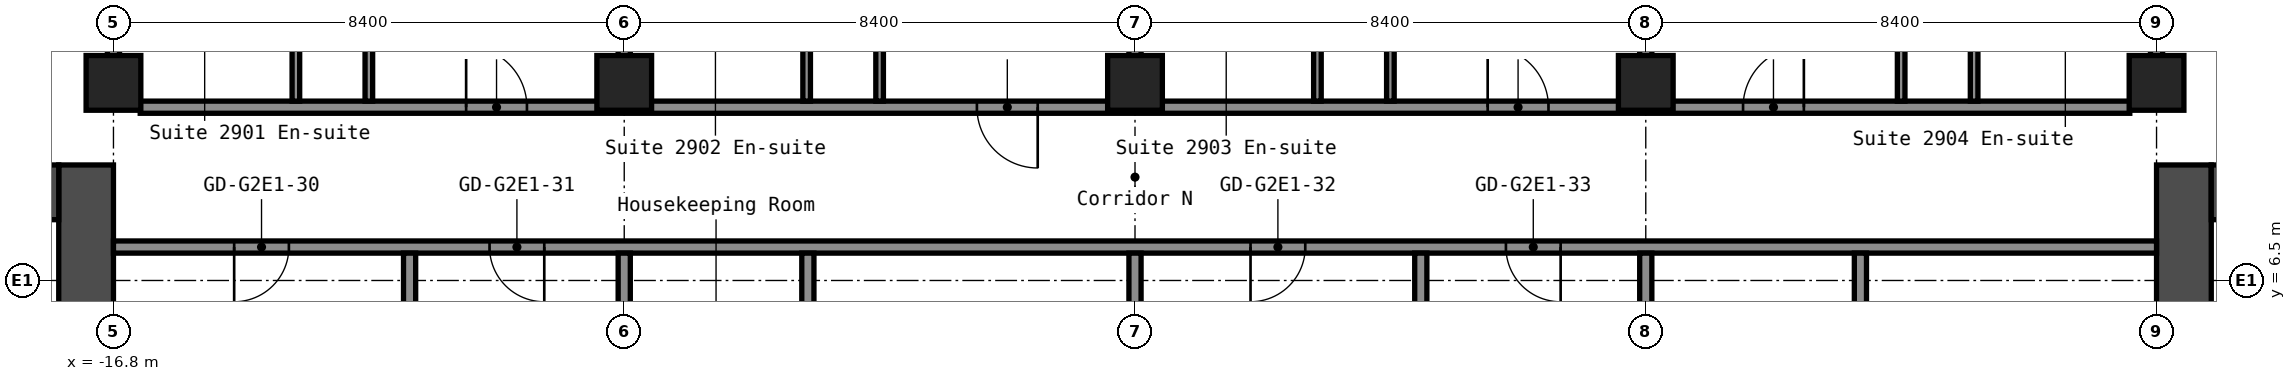
"""IFC4 building model, lengths in metres.
Left out: names, types, materials, properties, quantities, classifications, styles, units other than length and angle.
Written with IfcOpenShell. Run it as: python <this file> out.ifc"""

import sys

from ifc_helpers import new_model, si_unit, direction, frame, frame_2d, origin, origin_2d, place, context, subcontext, project, spatial, rectangle, hollow_rectangle, extrude, element, fill, save


model = new_model("IFC4")
c1 = context("Model", 3, precision=1e-05, world=origin(), true_north=direction((0.0, 1.0)))
c2 = subcontext(c1, "Body", "Model", "MODEL_VIEW")
j1 = project(units=[si_unit("LENGTHUNIT", "METRE"), si_unit("PLANEANGLEUNIT", "RADIAN")], contexts=[c1])
p1 = place(None, origin())
s1 = spatial("IfcSite", under=j1, at=p1, CompositionType="ELEMENT")
p2 = place(p1, origin())
s2 = spatial("IfcBuilding", under=s1, at=p2, CompositionType="ELEMENT")
p3 = place(p2, frame((0.0, 0.0, 104.2)))
s3 = spatial("IfcBuildingStorey", under=s2, at=p3, CompositionType="ELEMENT", Elevation=104.2)
for number, where, z_axis, x_axis in (
    (1, (-16.8, 9.75, 0.0), (0.0, 0.0, 1.0), (1.0, 0.0, 0.0)),
    (2, (-8.4, 9.75, 0.0), (0.0, 0.0, 1.0), (1.0, 0.0, 0.0)),
    (3, (0.0, 9.75, 0.0), (0.0, 0.0, 1.0), (1.0, 0.0, 0.0)),
    (4, (8.4, 9.75, 0.0), (0.0, 0.0, 1.0), (1.0, 0.0, 0.0)),
    (5, (16.8, 9.75, 0.0), (0.0, 0.0, 1.0), (1.0, 0.0, 0.0)),
):
    element("IfcColumn", number, at=place(p3, frame(where, z_axis=z_axis, x_axis=x_axis)), inside=s3, PredefinedType="COLUMN", context=c2, shape_type="SweptSolid", body=[
        extrude(hollow_rectangle(XDim=0.9, YDim=0.9, WallThickness=0.036, at=origin_2d()), origin(), (0.0, 0.0, 1.0), 2.8),
    ])
p4 = place(p3, frame((-17.25, -8.4, 0.0), z_axis=(0.0, 0.0, 1.0), x_axis=(0.0, 1.0, 0.0)))
e6 = element("IfcWall", 6, at=p4, inside=s3, PredefinedType="SHEAR", context=c2, shape_type="SweptSolid", body=[
    extrude(rectangle(XDim=16.8, YDim=0.9, at=frame_2d((8.4, 0.0))), origin(), (0.0, 0.0, 1.0), 2.8),
])
p5 = place(p4, frame((7.6, 0.0, 0.0)))
e7 = element("IfcOpeningElement", 7, at=p5, cuts=e6, PredefinedType="OPENING", context=c2, shape_type="SweptSolid", body=[
    extrude(rectangle(XDim=1.2, YDim=2.1, at=frame_2d((0.6, 1.05))), frame((0.0, 0.46, 0.0), z_axis=(0.0, -1.0, 0.0), x_axis=(1.0, 0.0, 0.0)), (0.0, 0.0, 1.0), 0.92),
])
p6 = place(p3, frame((-32.7, 7.95, 0.0), z_axis=(0.0, 0.0, 1.0), x_axis=(1.0, 0.0, 0.0)))
e8 = element("IfcWall", 8, at=p6, inside=s3, PredefinedType="SHEAR", context=c2, shape_type="SweptSolid", body=[
    extrude(rectangle(XDim=15.0, YDim=0.9, at=frame_2d((7.5, 0.0))), origin(), (0.0, 0.0, 1.0), 2.8),
])
p7 = place(p6, frame((3.4, 0.0, 0.0)))
e9 = element("IfcOpeningElement", 9, at=p7, cuts=e8, PredefinedType="OPENING", context=c2, shape_type="SweptSolid", body=[
    extrude(rectangle(XDim=1.2, YDim=2.1, at=frame_2d((0.6, 1.05))), frame((0.0, 0.46, 0.0), z_axis=(0.0, -1.0, 0.0), x_axis=(1.0, 0.0, 0.0)), (0.0, 0.0, 1.0), 0.92),
])
p8 = place(p6, frame((0.75, 0.0, 0.0)))
e10 = element("IfcOpeningElement", 10, at=p8, cuts=e8, PredefinedType="OPENING", context=c2, shape_type="SweptSolid", body=[
    extrude(rectangle(XDim=0.9, YDim=2.1, at=frame_2d((0.45, 1.05))), frame((0.0, 0.46, 0.0), z_axis=(0.0, -1.0, 0.0), x_axis=(1.0, 0.0, 0.0)), (0.0, 0.0, 1.0), 0.92),
])
p9 = place(p3, frame((17.25, -8.4, 0.0), z_axis=(0.0, 0.0, 1.0), x_axis=(0.0, 1.0, 0.0)))
e11 = element("IfcWall", 11, at=p9, inside=s3, PredefinedType="SHEAR", context=c2, shape_type="SweptSolid", body=[
    extrude(rectangle(XDim=16.8, YDim=0.9, at=frame_2d((8.4, 0.0))), origin(), (0.0, 0.0, 1.0), 2.8),
])
p10 = place(p9, frame((7.6, 0.0, 0.0)))
e12 = element("IfcOpeningElement", 12, at=p10, cuts=e11, PredefinedType="OPENING", context=c2, shape_type="SweptSolid", body=[
    extrude(rectangle(XDim=1.2, YDim=2.1, at=frame_2d((0.6, 1.05))), frame((0.0, 0.46, 0.0), z_axis=(0.0, -1.0, 0.0), x_axis=(1.0, 0.0, 0.0)), (0.0, 0.0, 1.0), 0.92),
])
p11 = place(p3, frame((17.7, 7.95, 0.0), z_axis=(0.0, 0.0, 1.0), x_axis=(1.0, 0.0, 0.0)))
e13 = element("IfcWall", 13, at=p11, inside=s3, PredefinedType="SHEAR", context=c2, shape_type="SweptSolid", body=[
    extrude(rectangle(XDim=15.0, YDim=0.9, at=frame_2d((7.5, 0.0))), origin(), (0.0, 0.0, 1.0), 2.8),
])
p12 = place(p11, frame((10.4, 0.0, 0.0)))
e14 = element("IfcOpeningElement", 14, at=p12, cuts=e13, PredefinedType="OPENING", context=c2, shape_type="SweptSolid", body=[
    extrude(rectangle(XDim=1.2, YDim=2.1, at=frame_2d((0.6, 1.05))), frame((0.0, 0.46, 0.0), z_axis=(0.0, -1.0, 0.0), x_axis=(1.0, 0.0, 0.0)), (0.0, 0.0, 1.0), 0.92),
])
p13 = place(p11, frame((13.35, 0.0, 0.0)))
e15 = element("IfcOpeningElement", 15, at=p13, cuts=e13, PredefinedType="OPENING", context=c2, shape_type="SweptSolid", body=[
    extrude(rectangle(XDim=0.9, YDim=2.1, at=frame_2d((0.45, 1.05))), frame((0.0, 0.46, 0.0), z_axis=(0.0, -1.0, 0.0), x_axis=(1.0, 0.0, 0.0)), (0.0, 0.0, 1.0), 0.92),
])
p14 = place(p3, frame((-16.8, 7.05, 0.0), z_axis=(0.0, 0.0, 1.0), x_axis=(1.0, 0.0, 0.0)))
e16 = element("IfcWall", 16, at=p14, inside=s3, PredefinedType="PARTITIONING", context=c2, shape_type="SweptSolid", body=[
    extrude(rectangle(XDim=33.6, YDim=0.2, at=frame_2d((16.8, 0.0))), origin(), (0.0, 0.0, 1.0), 2.8),
])
p15 = place(p14, frame((1.985, 0.0, 0.0)))
e17 = element("IfcOpeningElement", 17, at=p15, cuts=e16, PredefinedType="OPENING", context=c2, shape_type="SweptSolid", body=[
    extrude(rectangle(XDim=0.9, YDim=2.1, at=frame_2d((0.45, 1.05))), frame((0.0, 0.11, 0.0), z_axis=(0.0, -1.0, 0.0), x_axis=(1.0, 0.0, 0.0)), (0.0, 0.0, 1.0), 0.22),
])
p16 = place(p14, frame((6.185, 0.0, 0.0)))
e18 = element("IfcOpeningElement", 18, at=p16, cuts=e16, PredefinedType="OPENING", context=c2, shape_type="SweptSolid", body=[
    extrude(rectangle(XDim=0.9, YDim=2.1, at=frame_2d((0.45, 1.05))), frame((0.0, 0.11, 0.0), z_axis=(0.0, -1.0, 0.0), x_axis=(1.0, 0.0, 0.0)), (0.0, 0.0, 1.0), 0.22),
])
p17 = place(p14, frame((18.7, 0.0, 0.0)))
e19 = element("IfcOpeningElement", 19, at=p17, cuts=e16, PredefinedType="OPENING", context=c2, shape_type="SweptSolid", body=[
    extrude(rectangle(XDim=0.9, YDim=2.1, at=frame_2d((0.45, 1.05))), frame((0.0, 0.11, 0.0), z_axis=(0.0, -1.0, 0.0), x_axis=(1.0, 0.0, 0.0)), (0.0, 0.0, 1.0), 0.22),
])
p18 = place(p14, frame((22.9, 0.0, 0.0)))
e20 = element("IfcOpeningElement", 20, at=p18, cuts=e16, PredefinedType="OPENING", context=c2, shape_type="SweptSolid", body=[
    extrude(rectangle(XDim=0.9, YDim=2.1, at=frame_2d((0.45, 1.05))), frame((0.0, 0.11, 0.0), z_axis=(0.0, -1.0, 0.0), x_axis=(1.0, 0.0, 0.0)), (0.0, 0.0, 1.0), 0.22),
])
p19 = place(p3, frame((-16.36, 9.35, 0.0), z_axis=(0.0, 0.0, 1.0), x_axis=(1.0, 0.0, 0.0)))
e21 = element("IfcWall", 21, at=p19, inside=s3, PredefinedType="PARTITIONING", context=c2, shape_type="SweptSolid", body=[
    extrude(rectangle(XDim=32.72, YDim=0.2, at=frame_2d((16.36, 0.0))), origin(), (0.0, 0.0, 1.0), 2.8),
])
p20 = place(p19, frame((5.36, 0.0, 0.0)))
e22 = element("IfcOpeningElement", 22, at=p20, cuts=e21, PredefinedType="OPENING", context=c2, shape_type="SweptSolid", body=[
    extrude(rectangle(XDim=1.0, YDim=2.1, at=frame_2d((0.5, 1.05))), frame((0.0, 0.11, 0.0), z_axis=(0.0, -1.0, 0.0), x_axis=(1.0, 0.0, 0.0)), (0.0, 0.0, 1.0), 0.22),
])
p21 = place(p19, frame((13.76, 0.0, 0.0)))
e23 = element("IfcOpeningElement", 23, at=p21, cuts=e21, PredefinedType="OPENING", context=c2, shape_type="SweptSolid", body=[
    extrude(rectangle(XDim=1.0, YDim=2.1, at=frame_2d((0.5, 1.05))), frame((0.0, 0.11, 0.0), z_axis=(0.0, -1.0, 0.0), x_axis=(1.0, 0.0, 0.0)), (0.0, 0.0, 1.0), 0.22),
])
p22 = place(p19, frame((22.16, 0.0, 0.0)))
e24 = element("IfcOpeningElement", 24, at=p22, cuts=e21, PredefinedType="OPENING", context=c2, shape_type="SweptSolid", body=[
    extrude(rectangle(XDim=1.0, YDim=2.1, at=frame_2d((0.5, 1.05))), frame((0.0, 0.11, 0.0), z_axis=(0.0, -1.0, 0.0), x_axis=(1.0, 0.0, 0.0)), (0.0, 0.0, 1.0), 0.22),
])
p23 = place(p19, frame((26.36, 0.0, 0.0)))
e25 = element("IfcOpeningElement", 25, at=p23, cuts=e21, PredefinedType="OPENING", context=c2, shape_type="SweptSolid", body=[
    extrude(rectangle(XDim=1.0, YDim=2.1, at=frame_2d((0.5, 1.05))), frame((0.0, 0.11, 0.0), z_axis=(0.0, -1.0, 0.0), x_axis=(1.0, 0.0, 0.0)), (0.0, 0.0, 1.0), 0.22),
])
p24 = place(p3, frame((-16.8, 10.19, 0.0), z_axis=(0.0, 0.0, 1.0), x_axis=(0.0, 1.0, 0.0)))
e26 = element("IfcWall", 26, at=p24, inside=s3, PredefinedType="PARTITIONING", context=c2, shape_type="SweptSolid", body=[
    extrude(rectangle(XDim=13.36, YDim=0.2, at=frame_2d((6.68, 0.0))), origin(), (0.0, 0.0, 1.0), 2.8),
])
p25 = place(p3, frame((-13.8, 9.45, 0.0), z_axis=(0.0, 0.0, 1.0), x_axis=(0.0, 1.0, 0.0)))
e27 = element("IfcWall", 27, at=p25, inside=s3, PredefinedType="PARTITIONING", context=c2, shape_type="SweptSolid", body=[
    extrude(rectangle(XDim=3.1, YDim=0.125, at=frame_2d((1.55, 0.0))), origin(), (0.0, 0.0, 1.0), 2.8),
])
p26 = place(p3, frame((-12.6, 9.45, 0.0), z_axis=(0.0, 0.0, 1.0), x_axis=(0.0, 1.0, 0.0)))
e28 = element("IfcWall", 28, at=p26, inside=s3, PredefinedType="PARTITIONING", context=c2, shape_type="SweptSolid", body=[
    extrude(rectangle(XDim=14.1, YDim=0.125, at=frame_2d((7.05, 0.0))), origin(), (0.0, 0.0, 1.0), 2.8),
])
p27 = place(p26, frame((4.05, 0.0, 0.0)))
e29 = element("IfcOpeningElement", 29, at=p27, cuts=e28, PredefinedType="OPENING", context=c2, shape_type="SweptSolid", body=[
    extrude(rectangle(XDim=0.9, YDim=2.1, at=frame_2d((0.45, 1.05))), frame((0.0, 0.073, 0.0), z_axis=(0.0, -1.0, 0.0), x_axis=(1.0, 0.0, 0.0)), (0.0, 0.0, 1.0), 0.145),
])
for number, where, z_axis, x_axis in (
    (30, (-11.93, 1.05, 0.0), (0.0, 0.0, 1.0), (0.0, 1.0, 0.0)),
    (31, (-8.4, 1.05, 0.0), (0.0, 0.0, 1.0), (0.0, 1.0, 0.0)),
):
    element("IfcWall", number, at=place(p3, frame(where, z_axis=z_axis, x_axis=x_axis)), inside=s3, PredefinedType="PARTITIONING", context=c2, shape_type="SweptSolid", body=[
        extrude(rectangle(XDim=5.9, YDim=0.2, at=frame_2d((2.95, 0.0))), origin(), (0.0, 0.0, 1.0), 2.8),
    ])
p28 = place(p3, frame((-8.4, 10.19, 0.0), z_axis=(0.0, 0.0, 1.0), x_axis=(0.0, 1.0, 0.0)))
e32 = element("IfcWall", 32, at=p28, inside=s3, PredefinedType="PARTITIONING", context=c2, shape_type="SweptSolid", body=[
    extrude(rectangle(XDim=13.36, YDim=0.2, at=frame_2d((6.68, 0.0))), origin(), (0.0, 0.0, 1.0), 2.8),
])
p29 = place(p3, frame((-5.4, 9.45, 0.0), z_axis=(0.0, 0.0, 1.0), x_axis=(0.0, 1.0, 0.0)))
e33 = element("IfcWall", 33, at=p29, inside=s3, PredefinedType="PARTITIONING", context=c2, shape_type="SweptSolid", body=[
    extrude(rectangle(XDim=3.1, YDim=0.125, at=frame_2d((1.55, 0.0))), origin(), (0.0, 0.0, 1.0), 2.8),
])
p30 = place(p3, frame((-5.38, 1.05, 0.0), z_axis=(0.0, 0.0, 1.0), x_axis=(0.0, 1.0, 0.0)))
e34 = element("IfcWall", 34, at=p30, inside=s3, PredefinedType="PARTITIONING", context=c2, shape_type="SweptSolid", body=[
    extrude(rectangle(XDim=5.9, YDim=0.2, at=frame_2d((2.95, 0.0))), origin(), (0.0, 0.0, 1.0), 2.8),
])
p31 = place(p3, frame((-4.2, 9.45, 0.0), z_axis=(0.0, 0.0, 1.0), x_axis=(0.0, 1.0, 0.0)))
e35 = element("IfcWall", 35, at=p31, inside=s3, PredefinedType="PARTITIONING", context=c2, shape_type="SweptSolid", body=[
    extrude(rectangle(XDim=14.1, YDim=0.125, at=frame_2d((7.05, 0.0))), origin(), (0.0, 0.0, 1.0), 2.8),
])
p32 = place(p31, frame((4.05, 0.0, 0.0)))
e36 = element("IfcOpeningElement", 36, at=p32, cuts=e35, PredefinedType="OPENING", context=c2, shape_type="SweptSolid", body=[
    extrude(rectangle(XDim=0.9, YDim=2.1, at=frame_2d((0.45, 1.05))), frame((0.0, 0.073, 0.0), z_axis=(0.0, -1.0, 0.0), x_axis=(1.0, 0.0, 0.0)), (0.0, 0.0, 1.0), 0.145),
])
p33 = place(p3, frame((0.0, 1.05, 0.0), z_axis=(0.0, 0.0, 1.0), x_axis=(0.0, 1.0, 0.0)))
e37 = element("IfcWall", 37, at=p33, inside=s3, PredefinedType="PARTITIONING", context=c2, shape_type="SweptSolid", body=[
    extrude(rectangle(XDim=5.9, YDim=0.2, at=frame_2d((2.95, 0.0))), origin(), (0.0, 0.0, 1.0), 2.8),
])
p34 = place(p3, frame((0.0, 10.19, 0.0), z_axis=(0.0, 0.0, 1.0), x_axis=(0.0, 1.0, 0.0)))
e38 = element("IfcWall", 38, at=p34, inside=s3, PredefinedType="PARTITIONING", context=c2, shape_type="SweptSolid", body=[
    extrude(rectangle(XDim=13.36, YDim=0.2, at=frame_2d((6.68, 0.0))), origin(), (0.0, 0.0, 1.0), 2.8),
])
p35 = place(p3, frame((3.0, 9.45, 0.0), z_axis=(0.0, 0.0, 1.0), x_axis=(0.0, 1.0, 0.0)))
e39 = element("IfcWall", 39, at=p35, inside=s3, PredefinedType="PARTITIONING", context=c2, shape_type="SweptSolid", body=[
    extrude(rectangle(XDim=3.1, YDim=0.125, at=frame_2d((1.55, 0.0))), origin(), (0.0, 0.0, 1.0), 2.8),
])
p36 = place(p3, frame((4.2, 9.45, 0.0), z_axis=(0.0, 0.0, 1.0), x_axis=(0.0, 1.0, 0.0)))
e40 = element("IfcWall", 40, at=p36, inside=s3, PredefinedType="PARTITIONING", context=c2, shape_type="SweptSolid", body=[
    extrude(rectangle(XDim=14.1, YDim=0.125, at=frame_2d((7.05, 0.0))), origin(), (0.0, 0.0, 1.0), 2.8),
])
p37 = place(p36, frame((4.05, 0.0, 0.0)))
e41 = element("IfcOpeningElement", 41, at=p37, cuts=e40, PredefinedType="OPENING", context=c2, shape_type="SweptSolid", body=[
    extrude(rectangle(XDim=0.9, YDim=2.1, at=frame_2d((0.45, 1.05))), frame((0.0, 0.073, 0.0), z_axis=(0.0, -1.0, 0.0), x_axis=(1.0, 0.0, 0.0)), (0.0, 0.0, 1.0), 0.145),
])
for number, where, z_axis, x_axis in (
    (42, (4.7, 1.05, 0.0), (0.0, 0.0, 1.0), (0.0, 1.0, 0.0)),
    (43, (8.4, 1.05, 0.0), (0.0, 0.0, 1.0), (0.0, 1.0, 0.0)),
):
    element("IfcWall", number, at=place(p3, frame(where, z_axis=z_axis, x_axis=x_axis)), inside=s3, PredefinedType="PARTITIONING", context=c2, shape_type="SweptSolid", body=[
        extrude(rectangle(XDim=5.9, YDim=0.2, at=frame_2d((2.95, 0.0))), origin(), (0.0, 0.0, 1.0), 2.8),
    ])
p38 = place(p3, frame((8.4, 10.19, 0.0), z_axis=(0.0, 0.0, 1.0), x_axis=(0.0, 1.0, 0.0)))
e44 = element("IfcWall", 44, at=p38, inside=s3, PredefinedType="PARTITIONING", context=c2, shape_type="SweptSolid", body=[
    extrude(rectangle(XDim=13.36, YDim=0.2, at=frame_2d((6.68, 0.0))), origin(), (0.0, 0.0, 1.0), 2.8),
])
p39 = place(p3, frame((11.93, 1.05, 0.0), z_axis=(0.0, 0.0, 1.0), x_axis=(0.0, 1.0, 0.0)))
e45 = element("IfcWall", 45, at=p39, inside=s3, PredefinedType="PARTITIONING", context=c2, shape_type="SweptSolid", body=[
    extrude(rectangle(XDim=5.9, YDim=0.2, at=frame_2d((2.95, 0.0))), origin(), (0.0, 0.0, 1.0), 2.8),
])
p40 = place(p3, frame((12.6, 9.45, 0.0), z_axis=(0.0, 0.0, 1.0), x_axis=(0.0, 1.0, 0.0)))
e46 = element("IfcWall", 46, at=p40, inside=s3, PredefinedType="PARTITIONING", context=c2, shape_type="SweptSolid", body=[
    extrude(rectangle(XDim=14.1, YDim=0.125, at=frame_2d((7.05, 0.0))), origin(), (0.0, 0.0, 1.0), 2.8),
])
p41 = place(p40, frame((4.05, 0.0, 0.0)))
e47 = element("IfcOpeningElement", 47, at=p41, cuts=e46, PredefinedType="OPENING", context=c2, shape_type="SweptSolid", body=[
    extrude(rectangle(XDim=0.9, YDim=2.1, at=frame_2d((0.45, 1.05))), frame((0.0, 0.073, 0.0), z_axis=(0.0, -1.0, 0.0), x_axis=(1.0, 0.0, 0.0)), (0.0, 0.0, 1.0), 0.145),
])
p42 = place(p3, frame((13.8, 9.45, 0.0), z_axis=(0.0, 0.0, 1.0), x_axis=(0.0, 1.0, 0.0)))
e48 = element("IfcWall", 48, at=p42, inside=s3, PredefinedType="PARTITIONING", context=c2, shape_type="SweptSolid", body=[
    extrude(rectangle(XDim=3.1, YDim=0.125, at=frame_2d((1.55, 0.0))), origin(), (0.0, 0.0, 1.0), 2.8),
])
p43 = place(p3, frame((16.8, 10.19, 0.0), z_axis=(0.0, 0.0, 1.0), x_axis=(0.0, 1.0, 0.0)))
e49 = element("IfcWall", 49, at=p43, inside=s3, PredefinedType="PARTITIONING", context=c2, shape_type="SweptSolid", body=[
    extrude(rectangle(XDim=13.36, YDim=0.2, at=frame_2d((6.68, 0.0))), origin(), (0.0, 0.0, 1.0), 2.8),
])
p44 = place(p15, origin())
e50 = element("IfcDoor", 50, at=p44, inside=s3, OperationType="SINGLE_SWING_LEFT", PredefinedType="DOOR", context=c2, shape_type="SweptSolid", body=[
    extrude(rectangle(XDim=0.9, YDim=2.1, at=frame_2d((0.45, 1.05))), frame((0.0, 0.025, 0.0), z_axis=(0.0, -1.0, 0.0), x_axis=(1.0, 0.0, 0.0)), (0.0, 0.0, 1.0), 0.05),
])
fill(e17, e50)
p45 = place(p16, origin())
e51 = element("IfcDoor", 51, at=p45, inside=s3, OperationType="SINGLE_SWING_RIGHT", PredefinedType="DOOR", context=c2, shape_type="SweptSolid", body=[
    extrude(rectangle(XDim=0.9, YDim=2.1, at=frame_2d((0.45, 1.05))), frame((0.0, 0.025, 0.0), z_axis=(0.0, -1.0, 0.0), x_axis=(1.0, 0.0, 0.0)), (0.0, 0.0, 1.0), 0.05),
])
fill(e18, e51)
p46 = place(p17, origin())
e52 = element("IfcDoor", 52, at=p46, inside=s3, OperationType="SINGLE_SWING_LEFT", PredefinedType="DOOR", context=c2, shape_type="SweptSolid", body=[
    extrude(rectangle(XDim=0.9, YDim=2.1, at=frame_2d((0.45, 1.05))), frame((0.0, 0.025, 0.0), z_axis=(0.0, -1.0, 0.0), x_axis=(1.0, 0.0, 0.0)), (0.0, 0.0, 1.0), 0.05),
])
fill(e19, e52)
p47 = place(p18, origin())
e53 = element("IfcDoor", 53, at=p47, inside=s3, OperationType="SINGLE_SWING_RIGHT", PredefinedType="DOOR", context=c2, shape_type="SweptSolid", body=[
    extrude(rectangle(XDim=0.9, YDim=2.1, at=frame_2d((0.45, 1.05))), frame((0.0, 0.025, 0.0), z_axis=(0.0, -1.0, 0.0), x_axis=(1.0, 0.0, 0.0)), (0.0, 0.0, 1.0), 0.05),
])
fill(e20, e53)
p48 = place(p20, origin())
e54 = element("IfcDoor", 54, at=p48, inside=s3, OperationType="SINGLE_SWING_RIGHT", PredefinedType="DOOR", context=c2, shape_type="SweptSolid", body=[
    extrude(rectangle(XDim=1.0, YDim=2.1, at=frame_2d((0.5, 1.05))), frame((0.0, 0.025, 0.0), z_axis=(0.0, -1.0, 0.0), x_axis=(1.0, 0.0, 0.0)), (0.0, 0.0, 1.0), 0.05),
])
fill(e22, e54)
p49 = place(p21, origin())
e55 = element("IfcDoor", 55, at=p49, inside=s3, OperationType="SINGLE_SWING_RIGHT", PredefinedType="DOOR", context=c2, shape_type="SweptSolid", body=[
    extrude(rectangle(XDim=1.0, YDim=2.1, at=frame_2d((0.5, 1.05))), frame((0.0, 0.025, 0.0), z_axis=(0.0, -1.0, 0.0), x_axis=(1.0, 0.0, 0.0)), (0.0, 0.0, 1.0), 0.05),
])
fill(e23, e55)
p50 = place(p22, origin())
e56 = element("IfcDoor", 56, at=p50, inside=s3, OperationType="SINGLE_SWING_RIGHT", PredefinedType="DOOR", context=c2, shape_type="SweptSolid", body=[
    extrude(rectangle(XDim=1.0, YDim=2.1, at=frame_2d((0.5, 1.05))), frame((0.0, 0.025, 0.0), z_axis=(0.0, -1.0, 0.0), x_axis=(1.0, 0.0, 0.0)), (0.0, 0.0, 1.0), 0.05),
])
fill(e24, e56)
p51 = place(p23, origin())
e57 = element("IfcDoor", 57, at=p51, inside=s3, OperationType="SINGLE_SWING_LEFT", PredefinedType="DOOR", context=c2, shape_type="SweptSolid", body=[
    extrude(rectangle(XDim=1.0, YDim=2.1, at=frame_2d((0.5, 1.05))), frame((0.0, 0.025, 0.0), z_axis=(0.0, -1.0, 0.0), x_axis=(1.0, 0.0, 0.0)), (0.0, 0.0, 1.0), 0.05),
])
fill(e25, e57)
save(model, sys.argv[1])
